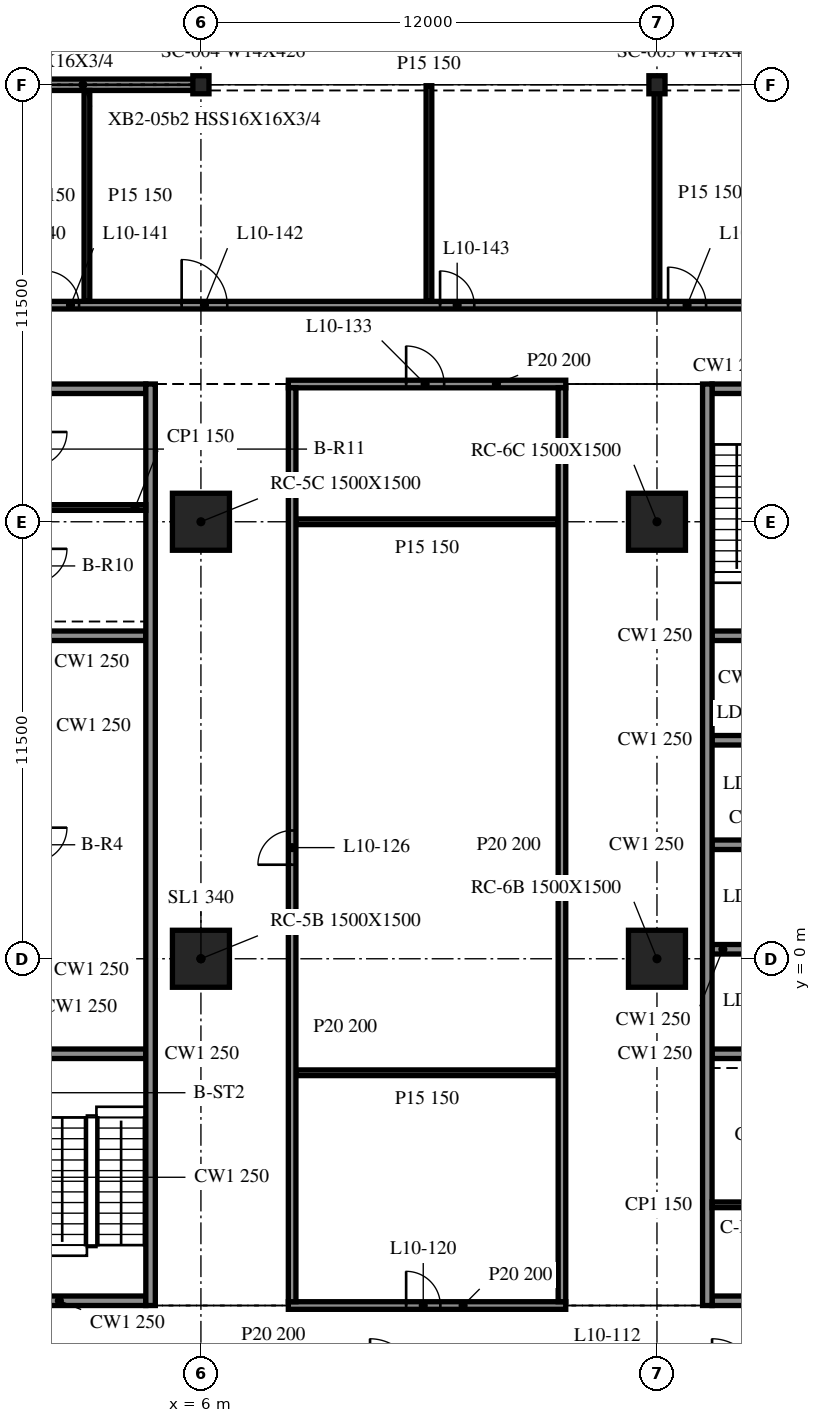
"""IFC4 building model, lengths in metres.
Left out: names, types, materials, properties, quantities, classifications, styles, units other than length and angle.
Written with IfcOpenShell. Run it as: python <this file> out.ifc"""

import sys

from ifc_helpers import new_model, si_unit, direction, frame, frame_2d, origin, origin_2d, place, context, subcontext, project, spatial, rectangle, i_section, extrude, element, fill, save


model = new_model("IFC4")
c1 = context("Model", 3, precision=1e-05, world=origin(), true_north=direction((0.0, 1.0)))
c2 = subcontext(c1, "Body", "Model", "MODEL_VIEW")
j1 = project(units=[si_unit("LENGTHUNIT", "METRE"), si_unit("PLANEANGLEUNIT", "RADIAN")], contexts=[c1])
p1 = place(None, origin())
s1 = spatial("IfcSite", under=j1, at=p1, CompositionType="ELEMENT")
p2 = place(p1, origin())
s2 = spatial("IfcBuilding", under=s1, at=p2, CompositionType="ELEMENT")
p3 = place(p2, frame((0.0, 0.0, 46.0)))
s3 = spatial("IfcBuildingStorey", under=s2, at=p3, CompositionType="ELEMENT", Elevation=46.0)
for number, where, z_axis, x_axis in (
    (1, (6.0, 0.0, -0.34), (0.0, 0.0, 1.0), (1.0, 0.0, 0.0)),
    (2, (6.0, 11.5, -0.34), (0.0, 0.0, 1.0), (1.0, 0.0, 0.0)),
    (3, (18.0, 0.0, -0.34), (0.0, 0.0, 1.0), (1.0, 0.0, 0.0)),
    (4, (18.0, 11.5, -0.34), (0.0, 0.0, 1.0), (1.0, 0.0, 0.0)),
):
    element("IfcColumn", number, at=place(p3, frame(where, z_axis=z_axis, x_axis=x_axis)), inside=s3, PredefinedType="COLUMN", context=c2, shape_type="SweptSolid", body=[
        extrude(rectangle(XDim=1.5, YDim=1.5, at=origin_2d()), origin(), (0.0, 0.0, 1.0), 4.3),
    ])
for number, where, z_axis, x_axis in (
    (5, (18.0, 23.0, -0.34), (0.0, 0.0, 1.0), (1.0, 0.0, 0.0)),
    (6, (6.0, 23.0, -0.34), (0.0, 0.0, 1.0), (1.0, 0.0, 0.0)),
):
    element("IfcColumn", number, at=place(p3, frame(where, z_axis=z_axis, x_axis=x_axis)), inside=s3, PredefinedType="COLUMN", context=c2, shape_type="SweptSolid", body=[
        extrude(i_section(OverallWidth=0.424, OverallDepth=0.475, WebThickness=0.048, FlangeThickness=0.077, at=origin_2d()), origin(), (0.0, 0.0, 1.0), 4.3),
    ])
p4 = place(p3, frame((5.976, 23.0, 0.0), z_axis=(0.0, 0.0, 1.0), x_axis=(-1.0, 0.0, 0.0)))
e7 = element("IfcWall", 7, at=p4, inside=s3, PredefinedType="NOTDEFINED", context=c2, shape_type="SweptSolid", body=[
    extrude(rectangle(XDim=11.952, YDim=0.3, at=frame_2d((5.976, 0.0))), origin(), (0.0, 0.0, 1.0), 3.203),
])
p5 = place(p3, frame((4.675, -9.125, 0.0), z_axis=(0.0, 0.0, 1.0), x_axis=(0.0, 1.0, 0.0)))
e8 = element("IfcWall", 8, at=p5, inside=s3, PredefinedType="SOLIDWALL", context=c2, shape_type="SweptSolid", body=[
    extrude(rectangle(XDim=24.25, YDim=0.25, at=frame_2d((12.125, 0.0))), origin(), (0.0, 0.0, 1.0), 3.96),
])
p6 = place(p3, frame((4.55, -9.0, 0.0), z_axis=(0.0, 0.0, 1.0), x_axis=(-1.0, 0.0, 0.0)))
e9 = element("IfcWall", 9, at=p6, inside=s3, PredefinedType="SOLIDWALL", context=c2, shape_type="SweptSolid", body=[
    extrude(rectangle(XDim=9.1, YDim=0.25, at=frame_2d((4.55, 0.0))), origin(), (0.0, 0.0, 1.0), 3.96),
])
p7 = place(p6, frame((3.65, 0.0, 0.0)))
e10 = element("IfcOpeningElement", 10, at=p7, cuts=e9, PredefinedType="OPENING", context=c2, shape_type="SweptSolid", body=[
    extrude(rectangle(XDim=1.8, YDim=2.1, at=frame_2d((0.9, 1.05))), frame((0.0, 0.135, 0.0), z_axis=(0.0, -1.0, 0.0), x_axis=(1.0, 0.0, 0.0)), (0.0, 0.0, 1.0), 0.27),
])
p8 = place(p3, frame((-4.55, 15.0, 0.0), z_axis=(0.0, 0.0, 1.0), x_axis=(1.0, 0.0, 0.0)))
e11 = element("IfcWall", 11, at=p8, inside=s3, PredefinedType="SOLIDWALL", context=c2, shape_type="SweptSolid", body=[
    extrude(rectangle(XDim=9.1, YDim=0.25, at=frame_2d((4.55, 0.0))), origin(), (0.0, 0.0, 1.0), 3.96),
])
p9 = place(p8, frame((3.65, 0.0, 0.0)))
e12 = element("IfcOpeningElement", 12, at=p9, cuts=e11, PredefinedType="OPENING", context=c2, shape_type="SweptSolid", body=[
    extrude(rectangle(XDim=1.8, YDim=2.1, at=frame_2d((0.9, 1.05))), frame((0.0, 0.135, 0.0), z_axis=(0.0, -1.0, 0.0), x_axis=(1.0, 0.0, 0.0)), (0.0, 0.0, 1.0), 0.27),
])
for number, where, z_axis, x_axis in (
    (13, (1.7, -2.5, 0.0), (0.0, 0.0, 1.0), (1.0, 0.0, 0.0)),
    (14, (1.7, 8.5, 0.0), (0.0, 0.0, 1.0), (1.0, 0.0, 0.0)),
):
    element("IfcWall", number, at=place(p3, frame(where, z_axis=z_axis, x_axis=x_axis)), inside=s3, PredefinedType="SOLIDWALL", context=c2, shape_type="SweptSolid", body=[
        extrude(rectangle(XDim=2.85, YDim=0.25, at=frame_2d((1.425, 0.0))), origin(), (0.0, 0.0, 1.0), 3.96),
    ])
p10 = place(p3, frame((1.7, 11.875, 0.0), z_axis=(0.0, 0.0, 1.0), x_axis=(1.0, 0.0, 0.0)))
e15 = element("IfcWall", 15, at=p10, inside=s3, PredefinedType="PARTITIONING", context=c2, shape_type="SweptSolid", body=[
    extrude(rectangle(XDim=2.85, YDim=0.15, at=frame_2d((1.425, 0.0))), origin(), (0.0, 0.0, 1.0), 3.96),
])
p11 = place(p3, frame((19.325, 15.125, 0.0), z_axis=(0.0, 0.0, 1.0), x_axis=(0.0, -1.0, 0.0)))
e16 = element("IfcWall", 16, at=p11, inside=s3, PredefinedType="SOLIDWALL", context=c2, shape_type="SweptSolid", body=[
    extrude(rectangle(XDim=24.25, YDim=0.25, at=frame_2d((12.125, 0.0))), origin(), (0.0, 0.0, 1.0), 3.96),
])
p12 = place(p3, frame((28.55, -9.0, 0.0), z_axis=(0.0, 0.0, 1.0), x_axis=(-1.0, 0.0, 0.0)))
e17 = element("IfcWall", 17, at=p12, inside=s3, PredefinedType="SOLIDWALL", context=c2, shape_type="SweptSolid", body=[
    extrude(rectangle(XDim=9.1, YDim=0.25, at=frame_2d((4.55, 0.0))), origin(), (0.0, 0.0, 1.0), 3.96),
])
p13 = place(p12, frame((3.65, 0.0, 0.0)))
e18 = element("IfcOpeningElement", 18, at=p13, cuts=e17, PredefinedType="OPENING", context=c2, shape_type="SweptSolid", body=[
    extrude(rectangle(XDim=1.8, YDim=2.1, at=frame_2d((0.9, 1.05))), frame((0.0, 0.135, 0.0), z_axis=(0.0, -1.0, 0.0), x_axis=(1.0, 0.0, 0.0)), (0.0, 0.0, 1.0), 0.27),
])
p14 = place(p3, frame((19.45, 15.0, 0.0), z_axis=(0.0, 0.0, 1.0), x_axis=(1.0, 0.0, 0.0)))
e19 = element("IfcWall", 19, at=p14, inside=s3, PredefinedType="SOLIDWALL", context=c2, shape_type="SweptSolid", body=[
    extrude(rectangle(XDim=9.1, YDim=0.25, at=frame_2d((4.55, 0.0))), origin(), (0.0, 0.0, 1.0), 3.96),
])
p15 = place(p14, frame((3.65, 0.0, 0.0)))
e20 = element("IfcOpeningElement", 20, at=p15, cuts=e19, PredefinedType="OPENING", context=c2, shape_type="SweptSolid", body=[
    extrude(rectangle(XDim=1.8, YDim=2.1, at=frame_2d((0.9, 1.05))), frame((0.0, 0.135, 0.0), z_axis=(0.0, -1.0, 0.0), x_axis=(1.0, 0.0, 0.0)), (0.0, 0.0, 1.0), 0.27),
])
for number, where, z_axis, x_axis in (
    (21, (19.45, -2.5, 0.0), (0.0, 0.0, 1.0), (1.0, 0.0, 0.0)),
    (22, (19.45, 0.25, 0.0), (0.0, 0.0, 1.0), (1.0, 0.0, 0.0)),
    (23, (19.45, 3.0, 0.0), (0.0, 0.0, 1.0), (1.0, 0.0, 0.0)),
    (24, (19.45, 5.75, 0.0), (0.0, 0.0, 1.0), (1.0, 0.0, 0.0)),
    (25, (19.45, 8.5, 0.0), (0.0, 0.0, 1.0), (1.0, 0.0, 0.0)),
):
    element("IfcWall", number, at=place(p3, frame(where, z_axis=z_axis, x_axis=x_axis)), inside=s3, PredefinedType="SOLIDWALL", context=c2, shape_type="SweptSolid", body=[
        extrude(rectangle(XDim=2.85, YDim=0.25, at=frame_2d((1.425, 0.0))), origin(), (0.0, 0.0, 1.0), 3.96),
    ])
p16 = place(p3, frame((19.45, -6.475, 0.0), z_axis=(0.0, 0.0, 1.0), x_axis=(1.0, 0.0, 0.0)))
e26 = element("IfcWall", 26, at=p16, inside=s3, PredefinedType="PARTITIONING", context=c2, shape_type="SweptSolid", body=[
    extrude(rectangle(XDim=2.85, YDim=0.15, at=frame_2d((1.425, 0.0))), origin(), (0.0, 0.0, 1.0), 3.96),
])
p17 = place(p3, frame((8.3, -9.125, 0.0), z_axis=(0.0, 0.0, 1.0), x_axis=(1.0, 0.0, 0.0)))
e27 = element("IfcWall", 27, at=p17, inside=s3, PredefinedType="PARTITIONING", context=c2, shape_type="SweptSolid", body=[
    extrude(rectangle(XDim=7.3, YDim=0.2, at=frame_2d((3.65, 0.0))), origin(), (0.0, 0.0, 1.0), 3.96),
])
p18 = place(p17, frame((3.1, 0.0, 0.0)))
e28 = element("IfcOpeningElement", 28, at=p18, cuts=e27, PredefinedType="OPENING", context=c2, shape_type="SweptSolid", body=[
    extrude(rectangle(XDim=0.9, YDim=2.1, at=frame_2d((0.45, 1.05))), frame((0.0, 0.11, 0.0), z_axis=(0.0, -1.0, 0.0), x_axis=(1.0, 0.0, 0.0)), (0.0, 0.0, 1.0), 0.22),
])
for number, where, z_axis, x_axis in (
    (29, (8.5, -3.0, 0.0), (0.0, 0.0, 1.0), (1.0, 0.0, 0.0)),
    (30, (8.5, 11.5, 0.0), (0.0, 0.0, 1.0), (1.0, 0.0, 0.0)),
):
    element("IfcWall", number, at=place(p3, frame(where, z_axis=z_axis, x_axis=x_axis)), inside=s3, PredefinedType="PARTITIONING", context=c2, shape_type="SweptSolid", body=[
        extrude(rectangle(XDim=6.9, YDim=0.15, at=frame_2d((3.45, 0.0))), origin(), (0.0, 0.0, 1.0), 3.96),
    ])
p19 = place(p3, frame((8.3, 15.125, 0.0), z_axis=(0.0, 0.0, 1.0), x_axis=(1.0, 0.0, 0.0)))
e31 = element("IfcWall", 31, at=p19, inside=s3, PredefinedType="PARTITIONING", context=c2, shape_type="SweptSolid", body=[
    extrude(rectangle(XDim=7.3, YDim=0.2, at=frame_2d((3.65, 0.0))), origin(), (0.0, 0.0, 1.0), 3.96),
])
p20 = place(p19, frame((3.1, 0.0, 0.0)))
e32 = element("IfcOpeningElement", 32, at=p20, cuts=e31, PredefinedType="OPENING", context=c2, shape_type="SweptSolid", body=[
    extrude(rectangle(XDim=1.0, YDim=2.1, at=frame_2d((0.5, 1.05))), frame((0.0, 0.11, 0.0), z_axis=(0.0, -1.0, 0.0), x_axis=(1.0, 0.0, 0.0)), (0.0, 0.0, 1.0), 0.22),
])
p21 = place(p3, frame((-41.807, 17.2, 0.0), z_axis=(0.0, 0.0, 1.0), x_axis=(1.0, 0.0, 0.0)))
e33 = element("IfcWall", 33, at=p21, inside=s3, PredefinedType="PARTITIONING", context=c2, shape_type="SweptSolid", body=[
    extrude(rectangle(XDim=95.615, YDim=0.2, at=frame_2d((47.807, 0.0))), origin(), (0.0, 0.0, 1.0), 3.96),
])
p22 = place(p21, frame((7.5, 0.0, 0.0)))
e34 = element("IfcOpeningElement", 34, at=p22, cuts=e33, PredefinedType="OPENING", context=c2, shape_type="SweptSolid", body=[
    extrude(rectangle(XDim=1.0, YDim=2.1, at=frame_2d((0.5, 1.05))), frame((0.0, 0.11, 0.0), z_axis=(0.0, -1.0, 0.0), x_axis=(1.0, 0.0, 0.0)), (0.0, 0.0, 1.0), 0.22),
])
p23 = place(p21, frame((10.9, 0.0, 0.0)))
e35 = element("IfcOpeningElement", 35, at=p23, cuts=e33, PredefinedType="OPENING", context=c2, shape_type="SweptSolid", body=[
    extrude(rectangle(XDim=1.0, YDim=2.1, at=frame_2d((0.5, 1.05))), frame((0.0, 0.11, 0.0), z_axis=(0.0, -1.0, 0.0), x_axis=(1.0, 0.0, 0.0)), (0.0, 0.0, 1.0), 0.22),
])
p24 = place(p21, frame((13.7, 0.0, 0.0)))
e36 = element("IfcOpeningElement", 36, at=p24, cuts=e33, PredefinedType="OPENING", context=c2, shape_type="SweptSolid", body=[
    extrude(rectangle(XDim=0.9, YDim=2.1, at=frame_2d((0.45, 1.05))), frame((0.0, 0.11, 0.0), z_axis=(0.0, -1.0, 0.0), x_axis=(1.0, 0.0, 0.0)), (0.0, 0.0, 1.0), 0.22),
])
p25 = place(p21, frame((22.3, 0.0, 0.0)))
e37 = element("IfcOpeningElement", 37, at=p25, cuts=e33, PredefinedType="OPENING", context=c2, shape_type="SweptSolid", body=[
    extrude(rectangle(XDim=1.2, YDim=2.1, at=frame_2d((0.6, 1.05))), frame((0.0, 0.11, 0.0), z_axis=(0.0, -1.0, 0.0), x_axis=(1.0, 0.0, 0.0)), (0.0, 0.0, 1.0), 0.22),
])
p26 = place(p21, frame((28.7, 0.0, 0.0)))
e38 = element("IfcOpeningElement", 38, at=p26, cuts=e33, PredefinedType="OPENING", context=c2, shape_type="SweptSolid", body=[
    extrude(rectangle(XDim=0.9, YDim=2.1, at=frame_2d((0.45, 1.05))), frame((0.0, 0.11, 0.0), z_axis=(0.0, -1.0, 0.0), x_axis=(1.0, 0.0, 0.0)), (0.0, 0.0, 1.0), 0.22),
])
p27 = place(p21, frame((37.5, 0.0, 0.0)))
e39 = element("IfcOpeningElement", 39, at=p27, cuts=e33, PredefinedType="OPENING", context=c2, shape_type="SweptSolid", body=[
    extrude(rectangle(XDim=1.0, YDim=2.1, at=frame_2d((0.5, 1.05))), frame((0.0, 0.11, 0.0), z_axis=(0.0, -1.0, 0.0), x_axis=(1.0, 0.0, 0.0)), (0.0, 0.0, 1.0), 0.22),
])
p28 = place(p21, frame((40.9, 0.0, 0.0)))
e40 = element("IfcOpeningElement", 40, at=p28, cuts=e33, PredefinedType="OPENING", context=c2, shape_type="SweptSolid", body=[
    extrude(rectangle(XDim=1.0, YDim=2.1, at=frame_2d((0.5, 1.05))), frame((0.0, 0.11, 0.0), z_axis=(0.0, -1.0, 0.0), x_axis=(1.0, 0.0, 0.0)), (0.0, 0.0, 1.0), 0.22),
])
p29 = place(p21, frame((43.7, 0.0, 0.0)))
e41 = element("IfcOpeningElement", 41, at=p29, cuts=e33, PredefinedType="OPENING", context=c2, shape_type="SweptSolid", body=[
    extrude(rectangle(XDim=0.9, YDim=2.1, at=frame_2d((0.45, 1.05))), frame((0.0, 0.11, 0.0), z_axis=(0.0, -1.0, 0.0), x_axis=(1.0, 0.0, 0.0)), (0.0, 0.0, 1.0), 0.22),
])
p30 = place(p21, frame((47.3, 0.0, 0.0)))
e42 = element("IfcOpeningElement", 42, at=p30, cuts=e33, PredefinedType="OPENING", context=c2, shape_type="SweptSolid", body=[
    extrude(rectangle(XDim=1.2, YDim=2.1, at=frame_2d((0.6, 1.05))), frame((0.0, 0.11, 0.0), z_axis=(0.0, -1.0, 0.0), x_axis=(1.0, 0.0, 0.0)), (0.0, 0.0, 1.0), 0.22),
])
p31 = place(p21, frame((54.1, 0.0, 0.0)))
e43 = element("IfcOpeningElement", 43, at=p31, cuts=e33, PredefinedType="OPENING", context=c2, shape_type="SweptSolid", body=[
    extrude(rectangle(XDim=0.9, YDim=2.1, at=frame_2d((0.45, 1.05))), frame((0.0, 0.11, 0.0), z_axis=(0.0, -1.0, 0.0), x_axis=(1.0, 0.0, 0.0)), (0.0, 0.0, 1.0), 0.22),
])
p32 = place(p21, frame((60.1, 0.0, 0.0)))
e44 = element("IfcOpeningElement", 44, at=p32, cuts=e33, PredefinedType="OPENING", context=c2, shape_type="SweptSolid", body=[
    extrude(rectangle(XDim=1.0, YDim=2.1, at=frame_2d((0.5, 1.05))), frame((0.0, 0.11, 0.0), z_axis=(0.0, -1.0, 0.0), x_axis=(1.0, 0.0, 0.0)), (0.0, 0.0, 1.0), 0.22),
])
p33 = place(p21, frame((69.1, 0.0, 0.0)))
e45 = element("IfcOpeningElement", 45, at=p33, cuts=e33, PredefinedType="OPENING", context=c2, shape_type="SweptSolid", body=[
    extrude(rectangle(XDim=1.0, YDim=2.1, at=frame_2d((0.5, 1.05))), frame((0.0, 0.11, 0.0), z_axis=(0.0, -1.0, 0.0), x_axis=(1.0, 0.0, 0.0)), (0.0, 0.0, 1.0), 0.22),
])
p34 = place(p21, frame((72.5, 0.0, 0.0)))
e46 = element("IfcOpeningElement", 46, at=p34, cuts=e33, PredefinedType="OPENING", context=c2, shape_type="SweptSolid", body=[
    extrude(rectangle(XDim=0.9, YDim=2.1, at=frame_2d((0.45, 1.05))), frame((0.0, 0.11, 0.0), z_axis=(0.0, -1.0, 0.0), x_axis=(1.0, 0.0, 0.0)), (0.0, 0.0, 1.0), 0.22),
])
p35 = place(p21, frame((75.1, 0.0, 0.0)))
e47 = element("IfcOpeningElement", 47, at=p35, cuts=e33, PredefinedType="OPENING", context=c2, shape_type="SweptSolid", body=[
    extrude(rectangle(XDim=1.2, YDim=2.1, at=frame_2d((0.6, 1.05))), frame((0.0, 0.11, 0.0), z_axis=(0.0, -1.0, 0.0), x_axis=(1.0, 0.0, 0.0)), (0.0, 0.0, 1.0), 0.22),
])
p36 = place(p21, frame((84.1, 0.0, 0.0)))
e48 = element("IfcOpeningElement", 48, at=p36, cuts=e33, PredefinedType="OPENING", context=c2, shape_type="SweptSolid", body=[
    extrude(rectangle(XDim=0.9, YDim=2.1, at=frame_2d((0.45, 1.05))), frame((0.0, 0.11, 0.0), z_axis=(0.0, -1.0, 0.0), x_axis=(1.0, 0.0, 0.0)), (0.0, 0.0, 1.0), 0.22),
])
p37 = place(p21, frame((90.1, 0.0, 0.0)))
e49 = element("IfcOpeningElement", 49, at=p37, cuts=e33, PredefinedType="OPENING", context=c2, shape_type="SweptSolid", body=[
    extrude(rectangle(XDim=1.0, YDim=2.1, at=frame_2d((0.5, 1.05))), frame((0.0, 0.11, 0.0), z_axis=(0.0, -1.0, 0.0), x_axis=(1.0, 0.0, 0.0)), (0.0, 0.0, 1.0), 0.22),
])
p38 = place(p3, frame((3.0, 17.3, 0.0), z_axis=(0.0, 0.0, 1.0), x_axis=(0.0, 1.0, 0.0)))
e50 = element("IfcWall", 50, at=p38, inside=s3, PredefinedType="PARTITIONING", context=c2, shape_type="SweptSolid", body=[
    extrude(rectangle(XDim=5.55, YDim=0.15, at=frame_2d((2.775, 0.0))), origin(), (0.0, 0.0, 1.0), 3.96),
])
p39 = place(p3, frame((8.4, -9.025, 0.0), z_axis=(0.0, 0.0, 1.0), x_axis=(0.0, 1.0, 0.0)))
e51 = element("IfcWall", 51, at=p39, inside=s3, PredefinedType="PARTITIONING", context=c2, shape_type="SweptSolid", body=[
    extrude(rectangle(XDim=24.05, YDim=0.2, at=frame_2d((12.025, 0.0))), origin(), (0.0, 0.0, 1.0), 3.96),
])
p40 = place(p39, frame((11.5, 0.0, 0.0)))
e52 = element("IfcOpeningElement", 52, at=p40, cuts=e51, PredefinedType="OPENING", context=c2, shape_type="SweptSolid", body=[
    extrude(rectangle(XDim=0.9, YDim=2.1, at=frame_2d((0.45, 1.05))), frame((0.0, 0.11, 0.0), z_axis=(0.0, -1.0, 0.0), x_axis=(1.0, 0.0, 0.0)), (0.0, 0.0, 1.0), 0.22),
])
p41 = place(p3, frame((12.0, 17.3, 0.0), z_axis=(0.0, 0.0, 1.0), x_axis=(0.0, 1.0, 0.0)))
e53 = element("IfcWall", 53, at=p41, inside=s3, PredefinedType="PARTITIONING", context=c2, shape_type="SweptSolid", body=[
    extrude(rectangle(XDim=5.675, YDim=0.15, at=frame_2d((2.837, 0.0))), origin(), (0.0, 0.0, 1.0), 3.96),
])
p42 = place(p3, frame((15.5, -9.025, 0.0), z_axis=(0.0, 0.0, 1.0), x_axis=(0.0, 1.0, 0.0)))
e54 = element("IfcWall", 54, at=p42, inside=s3, PredefinedType="PARTITIONING", context=c2, shape_type="SweptSolid", body=[
    extrude(rectangle(XDim=24.05, YDim=0.2, at=frame_2d((12.025, 0.0))), origin(), (0.0, 0.0, 1.0), 3.96),
])
p43 = place(p3, frame((18.0, 17.3, 0.0), z_axis=(0.0, 0.0, 1.0), x_axis=(0.0, 1.0, 0.0)))
e55 = element("IfcWall", 55, at=p43, inside=s3, PredefinedType="PARTITIONING", context=c2, shape_type="SweptSolid", body=[
    extrude(rectangle(XDim=5.675, YDim=0.15, at=frame_2d((2.837, 0.0))), origin(), (0.0, 0.0, 1.0), 3.96),
])
p44 = place(p18, origin())
e56 = element("IfcDoor", 56, at=p44, inside=s3, OperationType="SINGLE_SWING_LEFT", PredefinedType="DOOR", context=c2, shape_type="SweptSolid", body=[
    extrude(rectangle(XDim=0.9, YDim=2.1, at=frame_2d((0.45, 1.05))), frame((0.0, 0.025, 0.0), z_axis=(0.0, -1.0, 0.0), x_axis=(1.0, 0.0, 0.0)), (0.0, 0.0, 1.0), 0.05),
])
fill(e28, e56)
p45 = place(p40, origin())
e57 = element("IfcDoor", 57, at=p45, inside=s3, OperationType="SINGLE_SWING_RIGHT", PredefinedType="DOOR", context=c2, shape_type="SweptSolid", body=[
    extrude(rectangle(XDim=0.9, YDim=2.1, at=frame_2d((0.45, 1.05))), frame((0.0, 0.025, 0.0), z_axis=(0.0, -1.0, 0.0), x_axis=(1.0, 0.0, 0.0)), (0.0, 0.0, 1.0), 0.05),
])
fill(e52, e57)
p46 = place(p20, origin())
e58 = element("IfcDoor", 58, at=p46, inside=s3, OperationType="SINGLE_SWING_RIGHT", PredefinedType="DOOR", context=c2, shape_type="SweptSolid", body=[
    extrude(rectangle(XDim=1.0, YDim=2.1, at=frame_2d((0.5, 1.05))), frame((0.0, 0.025, 0.0), z_axis=(0.0, -1.0, 0.0), x_axis=(1.0, 0.0, 0.0)), (0.0, 0.0, 1.0), 0.05),
])
fill(e32, e58)
p47 = place(p29, origin())
e59 = element("IfcDoor", 59, at=p47, inside=s3, OperationType="SINGLE_SWING_LEFT", PredefinedType="DOOR", context=c2, shape_type="SweptSolid", body=[
    extrude(rectangle(XDim=0.9, YDim=2.1, at=frame_2d((0.45, 1.05))), frame((0.0, 0.025, 0.0), z_axis=(0.0, -1.0, 0.0), x_axis=(1.0, 0.0, 0.0)), (0.0, 0.0, 1.0), 0.05),
])
fill(e41, e59)
p48 = place(p30, origin())
e60 = element("IfcDoor", 60, at=p48, inside=s3, OperationType="SINGLE_SWING_RIGHT", PredefinedType="DOOR", context=c2, shape_type="SweptSolid", body=[
    extrude(rectangle(XDim=1.2, YDim=2.1, at=frame_2d((0.6, 1.05))), frame((0.0, 0.025, 0.0), z_axis=(0.0, -1.0, 0.0), x_axis=(1.0, 0.0, 0.0)), (0.0, 0.0, 1.0), 0.05),
])
fill(e42, e60)
p49 = place(p31, origin())
e61 = element("IfcDoor", 61, at=p49, inside=s3, OperationType="SINGLE_SWING_RIGHT", PredefinedType="DOOR", context=c2, shape_type="SweptSolid", body=[
    extrude(rectangle(XDim=0.9, YDim=2.1, at=frame_2d((0.45, 1.05))), frame((0.0, 0.025, 0.0), z_axis=(0.0, -1.0, 0.0), x_axis=(1.0, 0.0, 0.0)), (0.0, 0.0, 1.0), 0.05),
])
fill(e43, e61)
p50 = place(p32, origin())
e62 = element("IfcDoor", 62, at=p50, inside=s3, OperationType="SINGLE_SWING_RIGHT", PredefinedType="DOOR", context=c2, shape_type="SweptSolid", body=[
    extrude(rectangle(XDim=1.0, YDim=2.1, at=frame_2d((0.5, 1.05))), frame((0.0, 0.025, 0.0), z_axis=(0.0, -1.0, 0.0), x_axis=(1.0, 0.0, 0.0)), (0.0, 0.0, 1.0), 0.05),
])
fill(e44, e62)
save(model, sys.argv[1])
